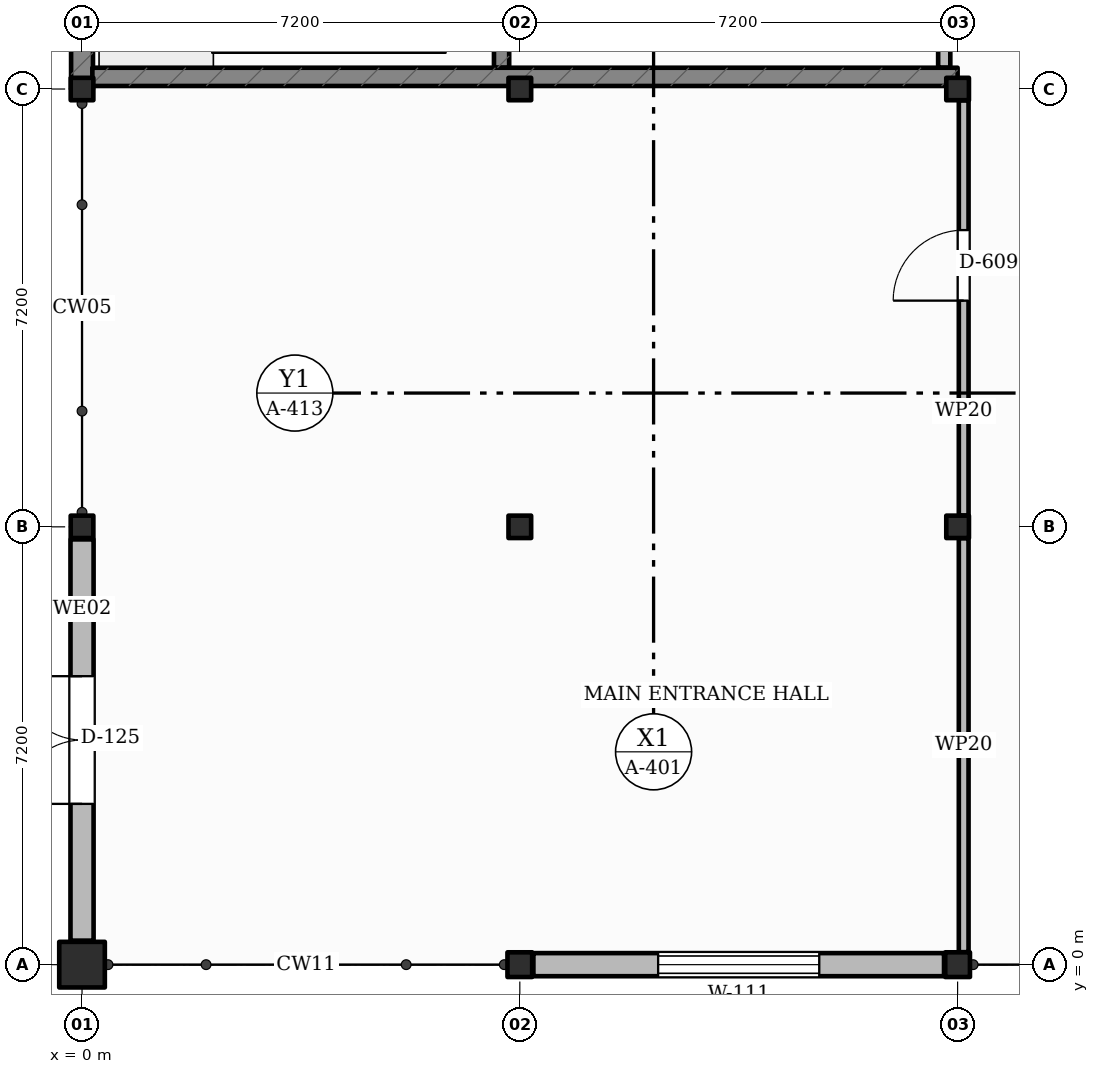
"""IFC4 building model, lengths in metres.
Left out: names, types, materials, properties, quantities, classifications, styles, units other than length and angle.
Written with IfcOpenShell. Run it as: python <this file> out.ifc"""

import sys

from ifc_helpers import new_model, si_unit, direction, frame, frame_2d, origin, origin_2d, place, context, subcontext, project, spatial, rectangle, hollow_circle, i_section, extrude, element, fill, save


model = new_model("IFC4")
c1 = context("Model", 3, precision=1e-05, world=origin(), true_north=direction((0.0, 1.0)))
c2 = subcontext(c1, "Body", "Model", "MODEL_VIEW")
j1 = project(units=[si_unit("LENGTHUNIT", "METRE"), si_unit("PLANEANGLEUNIT", "RADIAN")], contexts=[c1])
p1 = place(None, origin())
s1 = spatial("IfcSite", under=j1, at=p1, CompositionType="ELEMENT")
p2 = place(p1, origin())
s2 = spatial("IfcBuilding", under=s1, at=p2, CompositionType="ELEMENT")
p3 = place(p2, origin())
s3 = spatial("IfcBuildingStorey", under=s2, at=p3, CompositionType="ELEMENT", Elevation=0.0)
p4 = place(p3, frame((0.0, 0.0, -0.3), z_axis=(0.0, 0.0, 1.0), x_axis=(1.0, 0.0, 0.0)))
e1 = element("IfcColumn", 1, at=p4, inside=s3, PredefinedType="COLUMN", context=c2, shape_type="SweptSolid", body=[
    extrude(rectangle(XDim=0.75, YDim=0.75, at=origin_2d()), origin(), (0.0, 0.0, 1.0), 5.7),
])
for number, where, z_axis, x_axis in (
    (2, (0.0, 7.2, -0.3), (0.0, 0.0, 1.0), (1.0, 0.0, 0.0)),
    (3, (0.0, 14.4, -0.3), (0.0, 0.0, 1.0), (1.0, 0.0, 0.0)),
):
    element("IfcColumn", number, at=place(p3, frame(where, z_axis=z_axis, x_axis=x_axis)), inside=s3, PredefinedType="COLUMN", context=c2, shape_type="SweptSolid", body=[
        extrude(i_section(OverallWidth=0.373, OverallDepth=0.368, WebThickness=0.014, FlangeThickness=0.024, FilletRadius=0.015, at=origin_2d()), origin(), (0.0, 0.0, 1.0), 5.7),
    ])
p5 = place(p3, frame((7.2, 0.0, -0.3), z_axis=(0.0, 0.0, 1.0), x_axis=(1.0, 0.0, 0.0)))
e4 = element("IfcColumn", 4, at=p5, inside=s3, PredefinedType="COLUMN", context=c2, shape_type="SweptSolid", body=[
    extrude(hollow_circle(Radius=0.203, WallThickness=0.016, at=origin_2d()), origin(), (0.0, 0.0, 1.0), 5.7),
])
for number, where, z_axis, x_axis in (
    (5, (7.2, 7.2, -0.3), (0.0, 0.0, 1.0), (1.0, 0.0, 0.0)),
    (6, (7.2, 14.4, -0.3), (0.0, 0.0, 1.0), (1.0, 0.0, 0.0)),
):
    element("IfcColumn", number, at=place(p3, frame(where, z_axis=z_axis, x_axis=x_axis)), inside=s3, PredefinedType="COLUMN", context=c2, shape_type="SweptSolid", body=[
        extrude(i_section(OverallWidth=0.373, OverallDepth=0.368, WebThickness=0.014, FlangeThickness=0.024, FilletRadius=0.015, at=origin_2d()), origin(), (0.0, 0.0, 1.0), 5.7),
    ])
p6 = place(p3, frame((14.4, 0.0, -0.3), z_axis=(0.0, 0.0, 1.0), x_axis=(1.0, 0.0, 0.0)))
e7 = element("IfcColumn", 7, at=p6, inside=s3, PredefinedType="COLUMN", context=c2, shape_type="SweptSolid", body=[
    extrude(hollow_circle(Radius=0.203, WallThickness=0.016, at=origin_2d()), origin(), (0.0, 0.0, 1.0), 5.7),
])
for number, where, z_axis, x_axis in (
    (8, (14.4, 7.2, -0.3), (0.0, 0.0, 1.0), (1.0, 0.0, 0.0)),
    (9, (14.4, 14.4, -0.3), (0.0, 0.0, 1.0), (1.0, 0.0, 0.0)),
):
    element("IfcColumn", number, at=place(p3, frame(where, z_axis=z_axis, x_axis=x_axis)), inside=s3, PredefinedType="COLUMN", context=c2, shape_type="SweptSolid", body=[
        extrude(i_section(OverallWidth=0.373, OverallDepth=0.368, WebThickness=0.014, FlangeThickness=0.024, FilletRadius=0.015, at=origin_2d()), origin(), (0.0, 0.0, 1.0), 5.7),
    ])
p7 = place(p3, frame((0.0, 0.395, 0.0), z_axis=(0.0, 0.0, 1.0), x_axis=(0.0, 1.0, 0.0)))
e10 = element("IfcWall", 10, at=p7, inside=s3, PredefinedType="SOLIDWALL", context=c2, shape_type="SweptSolid", body=[
    extrude(rectangle(XDim=6.599, YDim=0.38, at=frame_2d((3.299, 0.0))), origin(), (0.0, 0.0, 1.0), 4.28),
])
p8 = place(p7, frame((2.249, 0.0, 0.0)))
e11 = element("IfcOpeningElement", 11, at=p8, cuts=e10, PredefinedType="OPENING", context=c2, shape_type="SweptSolid", body=[
    extrude(rectangle(XDim=2.1, YDim=2.35, at=frame_2d((1.05, 1.175))), frame((0.0, 0.2, 0.0), z_axis=(0.0, -1.0, 0.0), x_axis=(1.0, 0.0, 0.0)), (0.0, 0.0, 1.0), 0.4),
])
p9 = place(p3, frame((0.0, 14.4, 0.0), z_axis=(0.0, 0.0, 1.0), x_axis=(0.0, 1.0, 0.0)))
e12 = element("IfcWall", 12, at=p9, inside=s3, PredefinedType="SHEAR", context=c2, shape_type="SweptSolid", body=[
    extrude(rectangle(XDim=7.2, YDim=0.36, at=frame_2d((3.6, 0.0))), origin(), (0.0, 0.0, 1.0), 4.594),
])
p10 = place(p9, frame((2.85, 0.0, 0.0)))
e13 = element("IfcOpeningElement", 13, at=p10, cuts=e12, PredefinedType="OPENING", context=c2, shape_type="SweptSolid", body=[
    extrude(rectangle(XDim=1.5, YDim=2.15, at=frame_2d((0.75, 1.075))), frame((0.0, 0.19, 0.0), z_axis=(0.0, -1.0, 0.0), x_axis=(1.0, 0.0, 0.0)), (0.0, 0.0, 1.0), 0.38),
])
p11 = place(p3, frame((14.177, 0.0, 0.0), z_axis=(0.0, 0.0, 1.0), x_axis=(-1.0, 0.0, 0.0)))
e14 = element("IfcWall", 14, at=p11, inside=s3, PredefinedType="SOLIDWALL", context=c2, shape_type="SweptSolid", body=[
    extrude(rectangle(XDim=6.754, YDim=0.38, at=frame_2d((3.377, 0.0))), origin(), (0.0, 0.0, 1.0), 4.28),
])
p12 = place(p11, frame((2.052, 0.0, 1.05)))
e15 = element("IfcOpeningElement", 15, at=p12, cuts=e14, PredefinedType="OPENING", context=c2, shape_type="SweptSolid", body=[
    extrude(rectangle(XDim=2.65, YDim=1.6, at=frame_2d((1.325, 0.8))), frame((0.0, 0.2, 0.0), z_axis=(0.0, -1.0, 0.0), x_axis=(1.0, 0.0, 0.0)), (0.0, 0.0, 1.0), 0.4),
])
p13 = place(p3, frame((6.9, 14.75, 0.0), z_axis=(0.0, 0.0, 1.0), x_axis=(0.0, 1.0, 0.0)))
e16 = element("IfcWall", 16, at=p13, inside=s3, PredefinedType="SHEAR", context=c2, shape_type="SweptSolid", body=[
    extrude(rectangle(XDim=6.5, YDim=0.25, at=frame_2d((3.25, 0.0))), origin(), (0.0, 0.0, 1.0), 4.45),
])
p14 = place(p13, frame((0.95, 0.0, 0.0)))
e17 = element("IfcOpeningElement", 17, at=p14, cuts=e16, PredefinedType="OPENING", context=c2, shape_type="SweptSolid", body=[
    extrude(rectangle(XDim=1.35, YDim=2.15, at=frame_2d((0.675, 1.075))), frame((0.0, 0.135, 0.0), z_axis=(0.0, -1.0, 0.0), x_axis=(1.0, 0.0, 0.0)), (0.0, 0.0, 1.0), 0.27),
])
p15 = place(p3, frame((14.18, 14.75, 0.0), z_axis=(0.0, 0.0, 1.0), x_axis=(0.0, 1.0, 0.0)))
e18 = element("IfcWall", 18, at=p15, inside=s3, PredefinedType="SOLIDWALL", context=c2, shape_type="SweptSolid", body=[
    extrude(rectangle(XDim=6.5, YDim=0.2, at=frame_2d((3.25, 0.0))), origin(), (0.0, 0.0, 1.0), 4.45),
])
p16 = place(p15, frame((2.5, 0.0, 0.0)))
e19 = element("IfcOpeningElement", 19, at=p16, cuts=e18, PredefinedType="OPENING", context=c2, shape_type="SweptSolid", body=[
    extrude(rectangle(XDim=1.5, YDim=2.15, at=frame_2d((0.75, 1.075))), frame((0.0, 0.11, 0.0), z_axis=(0.0, -1.0, 0.0), x_axis=(1.0, 0.0, 0.0)), (0.0, 0.0, 1.0), 0.22),
])
p17 = place(p3, frame((0.17, 14.6, 0.0), z_axis=(0.0, 0.0, 1.0), x_axis=(1.0, 0.0, 0.0)))
e20 = element("IfcWall", 20, at=p17, inside=s3, PredefinedType="SHEAR", context=c2, shape_type="SweptSolid", body=[
    extrude(rectangle(XDim=14.23, YDim=0.3, at=frame_2d((7.115, 0.0))), origin(), (0.0, 0.0, 1.0), 4.45),
])
p18 = place(p3, frame((14.5, 0.205, 0.0), z_axis=(0.0, 0.0, 1.0), x_axis=(0.0, 1.0, 0.0)))
e21 = element("IfcWall", 21, at=p18, inside=s3, PredefinedType="PARTITIONING", context=c2, shape_type="SweptSolid", body=[
    extrude(rectangle(XDim=6.809, YDim=0.16, at=frame_2d((3.404, 0.0))), origin(), (0.0, 0.0, 1.0), 3.55),
])
p19 = place(p3, frame((14.5, 7.386, 0.0), z_axis=(0.0, 0.0, 1.0), x_axis=(0.0, 1.0, 0.0)))
e22 = element("IfcWall", 22, at=p19, inside=s3, PredefinedType="PARTITIONING", context=c2, shape_type="SweptSolid", body=[
    extrude(rectangle(XDim=6.828, YDim=0.16, at=frame_2d((3.414, 0.0))), origin(), (0.0, 0.0, 1.0), 3.55),
])
p20 = place(p19, frame((3.534, 0.0, 0.0)))
e23 = element("IfcOpeningElement", 23, at=p20, cuts=e22, PredefinedType="OPENING", context=c2, shape_type="SweptSolid", body=[
    extrude(rectangle(XDim=1.16, YDim=2.14, at=frame_2d((0.58, 1.07))), frame((0.0, 0.09, 0.0), z_axis=(0.0, -1.0, 0.0), x_axis=(1.0, 0.0, 0.0)), (0.0, 0.0, 1.0), 0.18),
])
p21 = place(p12, origin())
e24 = element("IfcWindow", 24, at=p21, inside=s3, PartitioningType="SINGLE_PANEL", PredefinedType="WINDOW", context=c2, shape_type="SweptSolid", body=[
    extrude(rectangle(XDim=2.65, YDim=1.6, at=frame_2d((1.325, 0.8))), frame((0.0, 0.03, 0.0), z_axis=(0.0, -1.0, 0.0), x_axis=(1.0, 0.0, 0.0)), (0.0, 0.0, 1.0), 0.06),
])
fill(e15, e24)
p22 = place(p8, origin())
e25 = element("IfcDoor", 25, at=p22, inside=s3, OperationType="DOUBLE_SWING_LEFT", PredefinedType="DOOR", context=c2, shape_type="SweptSolid", body=[
    extrude(rectangle(XDim=2.1, YDim=2.35, at=frame_2d((1.05, 1.175))), frame((0.0, 0.025, 0.0), z_axis=(0.0, -1.0, 0.0), x_axis=(1.0, 0.0, 0.0)), (0.0, 0.0, 1.0), 0.05),
])
fill(e11, e25)
p23 = place(p20, origin())
e26 = element("IfcDoor", 26, at=p23, inside=s3, OperationType="SINGLE_SWING_LEFT", PredefinedType="DOOR", context=c2, shape_type="SweptSolid", body=[
    extrude(rectangle(XDim=1.16, YDim=2.14, at=frame_2d((0.58, 1.07))), frame((0.0, 0.025, 0.0), z_axis=(0.0, -1.0, 0.0), x_axis=(1.0, 0.0, 0.0)), (0.0, 0.0, 1.0), 0.05),
])
fill(e23, e26)
save(model, sys.argv[1])
